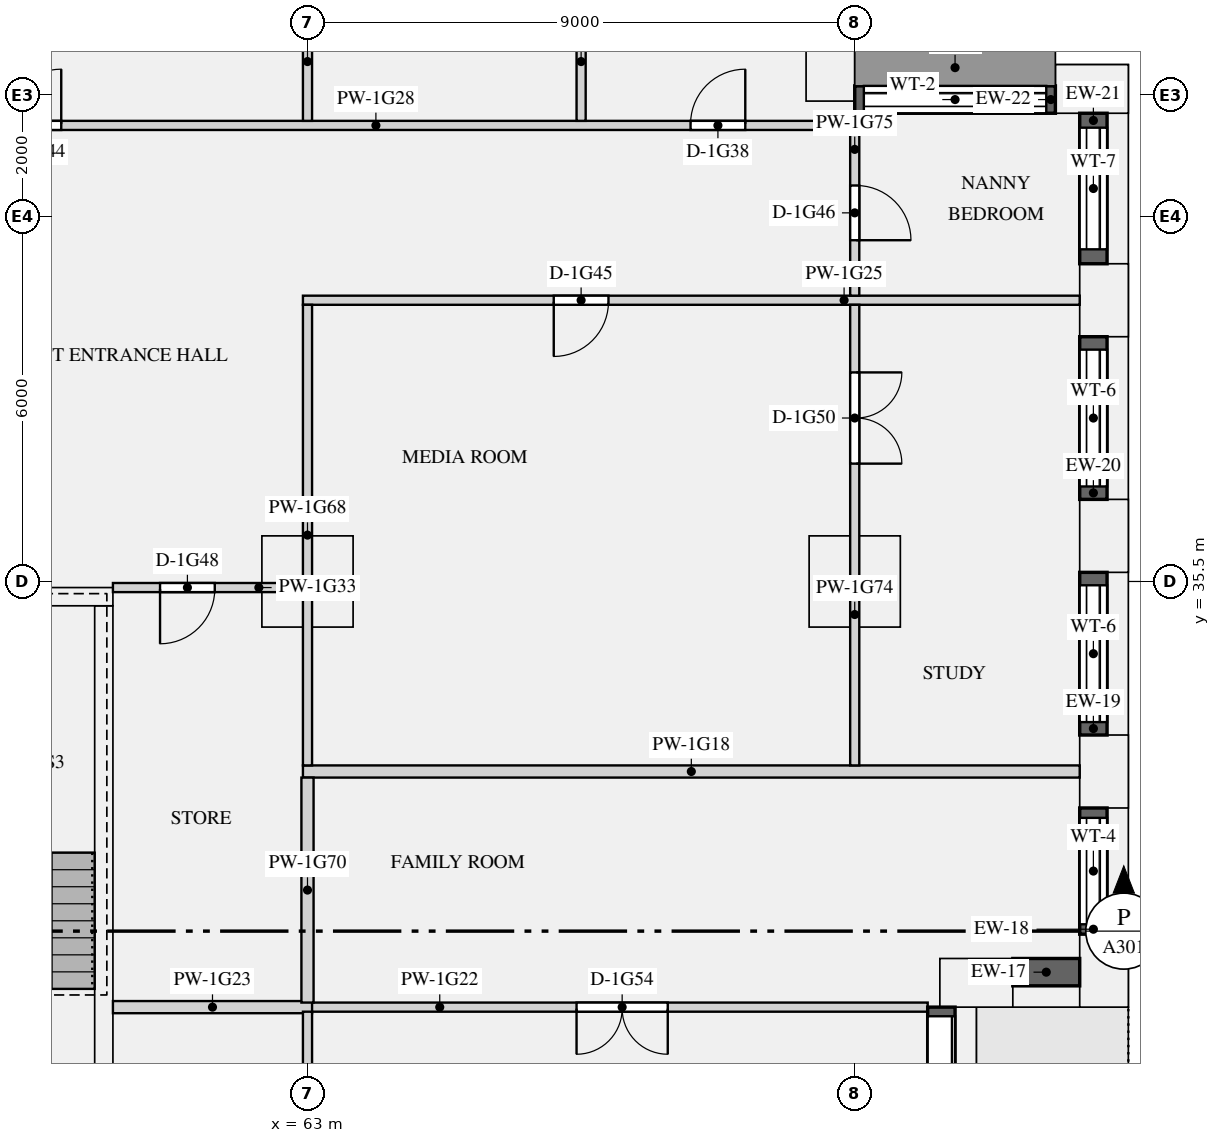
"""IFC4 building model, lengths in metres.
Left out: names, types, materials, properties, quantities, classifications, styles, units other than length and angle.
Written with IfcOpenShell. Run it as: python <this file> out.ifc"""

import sys

from ifc_helpers import new_model, si_unit, direction, frame, frame_2d, origin, origin_2d, place, context, subcontext, project, spatial, rectangle, extrude, element, fill, save


model = new_model("IFC4")
c1 = context("Model", 3, precision=1e-05, world=origin(), true_north=direction((0.0, 1.0)))
c2 = subcontext(c1, "Body", "Model", "MODEL_VIEW")
j1 = project(units=[si_unit("LENGTHUNIT", "METRE"), si_unit("PLANEANGLEUNIT", "RADIAN")], contexts=[c1])
p1 = place(None, origin())
s1 = spatial("IfcSite", under=j1, at=p1, CompositionType="ELEMENT")
p2 = place(p1, origin())
s2 = spatial("IfcBuilding", under=s1, at=p2, CompositionType="ELEMENT")
p3 = place(p2, frame((0.0, 0.0, 66.75)))
s3 = spatial("IfcBuildingStorey", under=s2, at=p3, CompositionType="ELEMENT", Elevation=66.75)
for number, where, z_axis, x_axis in (
    (1, (74.0, 28.9, 0.0), (0.0, 0.0, 1.0), (1.0, 0.0, 0.0)),
    (2, (76.1, 29.1, 0.0), (0.0, 0.0, 1.0), (0.0, 1.0, 0.0)),
    (3, (76.1, 32.375, 0.0), (0.0, 0.0, 1.0), (0.0, 1.0, 0.0)),
    (4, (76.1, 36.25, 0.0), (0.0, 0.0, 1.0), (0.0, 1.0, 0.0)),
    (5, (76.1, 40.125, 0.0), (0.0, 0.0, 1.0), (0.0, 1.0, 0.0)),
    (6, (75.9, 43.6, 0.0), (0.0, 0.0, 1.0), (-1.0, 0.0, 0.0)),
    (7, (71.6, 44.0, 0.0), (0.0, 0.0, 1.0), (0.0, 1.0, 0.0)),
):
    element("IfcColumn", number, at=place(p3, frame(where, z_axis=z_axis, x_axis=x_axis)), inside=s3, PredefinedType="USERDEFINED", context=c2, shape_type="SweptSolid", body=[
        extrude(rectangle(XDim=1.2, YDim=0.8, at=origin_2d()), origin(), (0.0, 0.0, 1.0), 3.15),
    ])
for number, where, z_axis, x_axis in (
    (8, (63.0, 35.5, 0.0), (0.0, 0.0, 1.0), (1.0, 0.0, 0.0)),
    (9, (72.0, 35.5, 0.0), (0.0, 0.0, 1.0), (1.0, 0.0, 0.0)),
):
    element("IfcColumn", number, at=place(p3, frame(where, z_axis=z_axis, x_axis=x_axis)), inside=s3, PredefinedType="COLUMN", context=c2, shape_type="SweptSolid", body=[
        extrude(rectangle(XDim=1.5, YDim=1.5, at=origin_2d()), origin(), (0.0, 0.0, 1.0), 3.15),
    ])
p4 = place(p3, frame((56.2, 35.25, 0.0), z_axis=(0.0, 0.0, 1.0), x_axis=(1.0, 0.0, 0.0)))
e10 = element("IfcWall", 10, at=p4, inside=s3, PredefinedType="SHEAR", context=c2, shape_type="SweptSolid", body=[
    extrude(rectangle(XDim=3.6, YDim=0.3, at=frame_2d((1.8, 0.0))), origin(), (0.0, 0.0, 1.0), 3.15),
])
p5 = place(p3, frame((59.65, 27.3, 0.0), z_axis=(0.0, 0.0, 1.0), x_axis=(0.0, 1.0, 0.0)))
e11 = element("IfcWall", 11, at=p5, inside=s3, PredefinedType="SHEAR", context=c2, shape_type="SweptSolid", body=[
    extrude(rectangle(XDim=7.8, YDim=0.3, at=frame_2d((3.9, 0.0))), origin(), (0.0, 0.0, 1.0), 3.15),
])
p6 = place(p3, frame((73.425, 25.1, 0.0), z_axis=(0.0, 0.0, 1.0), x_axis=(0.0, 1.0, 0.0)))
e12 = element("IfcWall", 12, at=p6, inside=s3, PredefinedType="SOLIDWALL", context=c2, shape_type="SweptSolid", body=[
    extrude(rectangle(XDim=3.4, YDim=0.45, at=frame_2d((1.7, 0.0))), origin(), (0.0, 0.0, 1.0), 2.83),
])
p7 = place(p6, frame((0.15, 0.0, 0.0)))
e13 = element("IfcOpeningElement", 13, at=p7, cuts=e12, PredefinedType="OPENING", context=c2, shape_type="SweptSolid", body=[
    extrude(rectangle(XDim=3.1, YDim=2.3, at=frame_2d((1.55, 1.15))), frame((0.0, 0.235, 0.0), z_axis=(0.0, -1.0, 0.0), x_axis=(1.0, 0.0, 0.0)), (0.0, 0.0, 1.0), 0.47),
])
p8 = place(p3, frame((74.6, 29.075, 0.9), z_axis=(0.0, 0.0, 1.0), x_axis=(1.0, 0.0, 0.0)))
e14 = element("IfcWall", 14, at=p8, inside=s3, PredefinedType="SOLIDWALL", context=c2, shape_type="SweptSolid", body=[
    extrude(rectangle(XDim=1.1, YDim=0.45, at=frame_2d((0.55, 0.0))), origin(), (0.0, 0.0, 1.0), 1.93),
])
p9 = place(p3, frame((75.925, 29.7, 0.9), z_axis=(0.0, 0.0, 1.0), x_axis=(0.0, 1.0, 0.0)))
e15 = element("IfcWall", 15, at=p9, inside=s3, PredefinedType="SOLIDWALL", context=c2, shape_type="SweptSolid", body=[
    extrude(rectangle(XDim=2.075, YDim=0.45, at=frame_2d((1.038, 0.0))), origin(), (0.0, 0.0, 1.0), 1.93),
])
p10 = place(p9, frame((0.163, 0.0, 0.15)))
e16 = element("IfcOpeningElement", 16, at=p10, cuts=e15, PredefinedType="OPENING", context=c2, shape_type="SweptSolid", body=[
    extrude(rectangle(XDim=1.75, YDim=1.5, at=frame_2d((0.875, 0.75))), frame((0.0, 0.235, 0.0), z_axis=(0.0, -1.0, 0.0), x_axis=(1.0, 0.0, 0.0)), (0.0, 0.0, 1.0), 0.47),
])
p11 = place(p3, frame((75.925, 32.975, 0.9), z_axis=(0.0, 0.0, 1.0), x_axis=(0.0, 1.0, 0.0)))
e17 = element("IfcWall", 17, at=p11, inside=s3, PredefinedType="SOLIDWALL", context=c2, shape_type="SweptSolid", body=[
    extrude(rectangle(XDim=2.675, YDim=0.45, at=frame_2d((1.337, 0.0))), origin(), (0.0, 0.0, 1.0), 1.93),
])
p12 = place(p11, frame((0.212, 0.0, 0.15)))
e18 = element("IfcOpeningElement", 18, at=p12, cuts=e17, PredefinedType="OPENING", context=c2, shape_type="SweptSolid", body=[
    extrude(rectangle(XDim=2.25, YDim=1.5, at=frame_2d((1.125, 0.75))), frame((0.0, 0.235, 0.0), z_axis=(0.0, -1.0, 0.0), x_axis=(1.0, 0.0, 0.0)), (0.0, 0.0, 1.0), 0.47),
])
p13 = place(p3, frame((75.925, 36.85, 0.9), z_axis=(0.0, 0.0, 1.0), x_axis=(0.0, 1.0, 0.0)))
e19 = element("IfcWall", 19, at=p13, inside=s3, PredefinedType="SOLIDWALL", context=c2, shape_type="SweptSolid", body=[
    extrude(rectangle(XDim=2.675, YDim=0.45, at=frame_2d((1.337, 0.0))), origin(), (0.0, 0.0, 1.0), 1.93),
])
p14 = place(p13, frame((0.212, 0.0, 0.15)))
e20 = element("IfcOpeningElement", 20, at=p14, cuts=e19, PredefinedType="OPENING", context=c2, shape_type="SweptSolid", body=[
    extrude(rectangle(XDim=2.25, YDim=1.5, at=frame_2d((1.125, 0.75))), frame((0.0, 0.235, 0.0), z_axis=(0.0, -1.0, 0.0), x_axis=(1.0, 0.0, 0.0)), (0.0, 0.0, 1.0), 0.47),
])
p15 = place(p3, frame((75.925, 40.725, 0.9), z_axis=(0.0, 0.0, 1.0), x_axis=(0.0, 1.0, 0.0)))
e21 = element("IfcWall", 21, at=p15, inside=s3, PredefinedType="SOLIDWALL", context=c2, shape_type="SweptSolid", body=[
    extrude(rectangle(XDim=2.475, YDim=0.45, at=frame_2d((1.237, 0.0))), origin(), (0.0, 0.0, 1.0), 1.93),
])
p16 = place(p15, frame((0.238, 0.0, 0.15)))
e22 = element("IfcOpeningElement", 22, at=p16, cuts=e21, PredefinedType="OPENING", context=c2, shape_type="SweptSolid", body=[
    extrude(rectangle(XDim=2.0, YDim=1.5, at=frame_2d((1.0, 0.75))), frame((0.0, 0.235, 0.0), z_axis=(0.0, -1.0, 0.0), x_axis=(1.0, 0.0, 0.0)), (0.0, 0.0, 1.0), 0.47),
])
p17 = place(p3, frame((75.3, 43.425, 0.9), z_axis=(0.0, 0.0, 1.0), x_axis=(-1.0, 0.0, 0.0)))
e23 = element("IfcWall", 23, at=p17, inside=s3, PredefinedType="SOLIDWALL", context=c2, shape_type="SweptSolid", body=[
    extrude(rectangle(XDim=3.3, YDim=0.45, at=frame_2d((1.65, 0.0))), origin(), (0.0, 0.0, 1.0), 1.93),
])
p18 = place(p17, frame((0.15, 0.0, 0.15)))
e24 = element("IfcOpeningElement", 24, at=p18, cuts=e23, PredefinedType="OPENING", context=c2, shape_type="SweptSolid", body=[
    extrude(rectangle(XDim=3.0, YDim=1.5, at=frame_2d((1.5, 0.75))), frame((0.0, 0.235, 0.0), z_axis=(0.0, -1.0, 0.0), x_axis=(1.0, 0.0, 0.0)), (0.0, 0.0, 1.0), 0.47),
])
p19 = place(p3, frame((62.925, 32.375, 0.0), z_axis=(0.0, 0.0, 1.0), x_axis=(1.0, 0.0, 0.0)))
e25 = element("IfcWall", 25, at=p19, inside=s3, PredefinedType="PARTITIONING", context=c2, shape_type="SweptSolid", body=[
    extrude(rectangle(XDim=12.775, YDim=0.2, at=frame_2d((6.387, 0.0))), origin(), (0.0, 0.0, 1.0), 2.83),
])
p20 = place(p3, frame((62.925, 28.5, 0.0), z_axis=(0.0, 0.0, 1.0), x_axis=(1.0, 0.0, 0.0)))
e26 = element("IfcWall", 26, at=p20, inside=s3, PredefinedType="PARTITIONING", context=c2, shape_type="SweptSolid", body=[
    extrude(rectangle(XDim=10.275, YDim=0.15, at=frame_2d((5.137, 0.0))), origin(), (0.0, 0.0, 1.0), 2.83),
])
p21 = place(p20, frame((4.5, 0.0, 0.0)))
e27 = element("IfcOpeningElement", 27, at=p21, cuts=e26, PredefinedType="OPENING", context=c2, shape_type="SweptSolid", body=[
    extrude(rectangle(XDim=1.5, YDim=2.1, at=frame_2d((0.75, 1.05))), frame((0.0, 0.085, 0.0), z_axis=(0.0, -1.0, 0.0), x_axis=(1.0, 0.0, 0.0)), (0.0, 0.0, 1.0), 0.17),
])
p22 = place(p3, frame((59.8, 28.5, 0.0), z_axis=(0.0, 0.0, 1.0), x_axis=(1.0, 0.0, 0.0)))
e28 = element("IfcWall", 28, at=p22, inside=s3, PredefinedType="PARTITIONING", context=c2, shape_type="SweptSolid", body=[
    extrude(rectangle(XDim=3.275, YDim=0.2, at=frame_2d((1.637, 0.0))), origin(), (0.0, 0.0, 1.0), 2.83),
])
p23 = place(p3, frame((62.925, 40.125, 0.0), z_axis=(0.0, 0.0, 1.0), x_axis=(1.0, 0.0, 0.0)))
e29 = element("IfcWall", 29, at=p23, inside=s3, PredefinedType="PARTITIONING", context=c2, shape_type="SweptSolid", body=[
    extrude(rectangle(XDim=12.775, YDim=0.15, at=frame_2d((6.387, 0.0))), origin(), (0.0, 0.0, 1.0), 2.83),
])
p24 = place(p23, frame((4.125, 0.0, 0.0)))
e30 = element("IfcOpeningElement", 30, at=p24, cuts=e29, PredefinedType="OPENING", context=c2, shape_type="SweptSolid", body=[
    extrude(rectangle(XDim=0.9, YDim=2.1, at=frame_2d((0.45, 1.05))), frame((0.0, 0.085, 0.0), z_axis=(0.0, -1.0, 0.0), x_axis=(1.0, 0.0, 0.0)), (0.0, 0.0, 1.0), 0.17),
])
p25 = place(p3, frame((53.925, 43.0, 0.0), z_axis=(0.0, 0.0, 1.0), x_axis=(1.0, 0.0, 0.0)))
e31 = element("IfcWall", 31, at=p25, inside=s3, PredefinedType="PARTITIONING", context=c2, shape_type="SweptSolid", body=[
    extrude(rectangle(XDim=18.0, YDim=0.15, at=frame_2d((9.0, 0.0))), origin(), (0.0, 0.0, 1.0), 2.83),
])
p26 = place(p25, frame((15.375, 0.0, 0.0)))
e32 = element("IfcOpeningElement", 32, at=p26, cuts=e31, PredefinedType="OPENING", context=c2, shape_type="SweptSolid", body=[
    extrude(rectangle(XDim=0.9, YDim=2.1, at=frame_2d((0.45, 1.05))), frame((0.0, 0.085, 0.0), z_axis=(0.0, -1.0, 0.0), x_axis=(1.0, 0.0, 0.0)), (0.0, 0.0, 1.0), 0.17),
])
p27 = place(p25, frame((4.125, 0.0, 0.0)))
e33 = element("IfcOpeningElement", 33, at=p27, cuts=e31, PredefinedType="OPENING", context=c2, shape_type="SweptSolid", body=[
    extrude(rectangle(XDim=0.9, YDim=2.1, at=frame_2d((0.45, 1.05))), frame((0.0, 0.085, 0.0), z_axis=(0.0, -1.0, 0.0), x_axis=(1.0, 0.0, 0.0)), (0.0, 0.0, 1.0), 0.17),
])
p28 = place(p3, frame((59.8, 35.4, 0.0), z_axis=(0.0, 0.0, 1.0), x_axis=(1.0, 0.0, 0.0)))
e34 = element("IfcWall", 34, at=p28, inside=s3, PredefinedType="PARTITIONING", context=c2, shape_type="SweptSolid", body=[
    extrude(rectangle(XDim=3.125, YDim=0.15, at=frame_2d((1.562, 0.0))), origin(), (0.0, 0.0, 1.0), 2.83),
])
p29 = place(p28, frame((0.775, 0.0, 0.0)))
e35 = element("IfcOpeningElement", 35, at=p29, cuts=e34, PredefinedType="OPENING", context=c2, shape_type="SweptSolid", body=[
    extrude(rectangle(XDim=0.9, YDim=2.1, at=frame_2d((0.45, 1.05))), frame((0.0, 0.085, 0.0), z_axis=(0.0, -1.0, 0.0), x_axis=(1.0, 0.0, 0.0)), (0.0, 0.0, 1.0), 0.17),
])
p30 = place(p3, frame((63.0, 12.575, 0.0), z_axis=(0.0, 0.0, 1.0), x_axis=(0.0, 1.0, 0.0)))
e36 = element("IfcWall", 36, at=p30, inside=s3, PredefinedType="PARTITIONING", context=c2, shape_type="SweptSolid", body=[
    extrude(rectangle(XDim=15.85, YDim=0.15, at=frame_2d((7.925, 0.0))), origin(), (0.0, 0.0, 1.0), 2.83),
])
p31 = place(p30, frame((6.85, 0.0, 0.0)))
e37 = element("IfcOpeningElement", 37, at=p31, cuts=e36, PredefinedType="OPENING", context=c2, shape_type="SweptSolid", body=[
    extrude(rectangle(XDim=0.9, YDim=2.1, at=frame_2d((0.45, 1.05))), frame((0.0, 0.085, 0.0), z_axis=(0.0, -1.0, 0.0), x_axis=(1.0, 0.0, 0.0)), (0.0, 0.0, 1.0), 0.17),
])
p32 = place(p3, frame((63.0, 32.475, 0.0), z_axis=(0.0, 0.0, 1.0), x_axis=(0.0, 1.0, 0.0)))
e38 = element("IfcWall", 38, at=p32, inside=s3, PredefinedType="PARTITIONING", context=c2, shape_type="SweptSolid", body=[
    extrude(rectangle(XDim=7.575, YDim=0.15, at=frame_2d((3.788, 0.0))), origin(), (0.0, 0.0, 1.0), 2.83),
])
p33 = place(p3, frame((63.0, 43.075, 0.0), z_axis=(0.0, 0.0, 1.0), x_axis=(0.0, 1.0, 0.0)))
e39 = element("IfcWall", 39, at=p33, inside=s3, PredefinedType="PARTITIONING", context=c2, shape_type="SweptSolid", body=[
    extrude(rectangle(XDim=4.625, YDim=0.15, at=frame_2d((2.312, 0.0))), origin(), (0.0, 0.0, 1.0), 2.83),
])
p34 = place(p33, frame((1.95, 0.0, 0.0)))
e40 = element("IfcOpeningElement", 40, at=p34, cuts=e39, PredefinedType="OPENING", context=c2, shape_type="SweptSolid", body=[
    extrude(rectangle(XDim=0.8, YDim=2.1, at=frame_2d((0.4, 1.05))), frame((0.0, 0.085, 0.0), z_axis=(0.0, -1.0, 0.0), x_axis=(1.0, 0.0, 0.0)), (0.0, 0.0, 1.0), 0.17),
])
p35 = place(p3, frame((63.0, 28.575, 0.0), z_axis=(0.0, 0.0, 1.0), x_axis=(0.0, 1.0, 0.0)))
e41 = element("IfcWall", 41, at=p35, inside=s3, PredefinedType="PARTITIONING", context=c2, shape_type="SweptSolid", body=[
    extrude(rectangle(XDim=3.7, YDim=0.2, at=frame_2d((1.85, 0.0))), origin(), (0.0, 0.0, 1.0), 2.83),
])
p36 = place(p3, frame((72.0, 32.475, 0.0), z_axis=(0.0, 0.0, 1.0), x_axis=(0.0, 1.0, 0.0)))
e42 = element("IfcWall", 42, at=p36, inside=s3, PredefinedType="PARTITIONING", context=c2, shape_type="SweptSolid", body=[
    extrude(rectangle(XDim=7.575, YDim=0.15, at=frame_2d((3.788, 0.0))), origin(), (0.0, 0.0, 1.0), 2.83),
])
p37 = place(p36, frame((4.963, 0.0, 0.0)))
e43 = element("IfcOpeningElement", 43, at=p37, cuts=e42, PredefinedType="OPENING", context=c2, shape_type="SweptSolid", body=[
    extrude(rectangle(XDim=1.5, YDim=2.1, at=frame_2d((0.75, 1.05))), frame((0.0, 0.085, 0.0), z_axis=(0.0, -1.0, 0.0), x_axis=(1.0, 0.0, 0.0)), (0.0, 0.0, 1.0), 0.17),
])
p38 = place(p3, frame((72.0, 40.2, 0.0), z_axis=(0.0, 0.0, 1.0), x_axis=(0.0, 1.0, 0.0)))
e44 = element("IfcWall", 44, at=p38, inside=s3, PredefinedType="PARTITIONING", context=c2, shape_type="SweptSolid", body=[
    extrude(rectangle(XDim=3.0, YDim=0.15, at=frame_2d((1.5, 0.0))), origin(), (0.0, 0.0, 1.0), 2.83),
])
p39 = place(p38, frame((0.912, 0.0, 0.0)))
e45 = element("IfcOpeningElement", 45, at=p39, cuts=e44, PredefinedType="OPENING", context=c2, shape_type="SweptSolid", body=[
    extrude(rectangle(XDim=0.9, YDim=2.1, at=frame_2d((0.45, 1.05))), frame((0.0, 0.085, 0.0), z_axis=(0.0, -1.0, 0.0), x_axis=(1.0, 0.0, 0.0)), (0.0, 0.0, 1.0), 0.17),
])
p40 = place(p3, frame((67.5, 43.075, 0.0), z_axis=(0.0, 0.0, 1.0), x_axis=(0.0, 1.0, 0.0)))
e46 = element("IfcWall", 46, at=p40, inside=s3, PredefinedType="PARTITIONING", context=c2, shape_type="SweptSolid", body=[
    extrude(rectangle(XDim=4.625, YDim=0.15, at=frame_2d((2.312, 0.0))), origin(), (0.0, 0.0, 1.0), 2.83),
])
p41 = place(p40, frame((1.95, 0.0, 0.0)))
e47 = element("IfcOpeningElement", 47, at=p41, cuts=e46, PredefinedType="OPENING", context=c2, shape_type="SweptSolid", body=[
    extrude(rectangle(XDim=0.8, YDim=2.1, at=frame_2d((0.4, 1.05))), frame((0.0, 0.085, 0.0), z_axis=(0.0, -1.0, 0.0), x_axis=(1.0, 0.0, 0.0)), (0.0, 0.0, 1.0), 0.17),
])
p42 = place(p7, origin())
e48 = element("IfcDoor", 48, at=p42, inside=s3, OperationType="SLIDING_TO_LEFT", PredefinedType="DOOR", context=c2, shape_type="SweptSolid", body=[
    extrude(rectangle(XDim=3.1, YDim=2.3, at=frame_2d((1.55, 1.15))), frame((0.0, -0.07, 0.0), z_axis=(0.0, -1.0, 0.0), x_axis=(1.0, 0.0, 0.0)), (0.0, 0.0, 1.0), 0.05),
])
fill(e13, e48)
p43 = place(p10, origin())
e49 = element("IfcWindow", 49, at=p43, inside=s3, PartitioningType="SINGLE_PANEL", PredefinedType="WINDOW", context=c2, shape_type="SweptSolid", body=[
    extrude(rectangle(XDim=1.75, YDim=1.5, at=frame_2d((0.875, 0.75))), frame((0.0, -0.065, 0.0), z_axis=(0.0, -1.0, 0.0), x_axis=(1.0, 0.0, 0.0)), (0.0, 0.0, 1.0), 0.06),
])
fill(e16, e49)
p44 = place(p12, origin())
e50 = element("IfcWindow", 50, at=p44, inside=s3, PartitioningType="SINGLE_PANEL", PredefinedType="WINDOW", context=c2, shape_type="SweptSolid", body=[
    extrude(rectangle(XDim=2.25, YDim=1.5, at=frame_2d((1.125, 0.75))), frame((0.0, -0.065, 0.0), z_axis=(0.0, -1.0, 0.0), x_axis=(1.0, 0.0, 0.0)), (0.0, 0.0, 1.0), 0.06),
])
fill(e18, e50)
p45 = place(p14, origin())
e51 = element("IfcWindow", 51, at=p45, inside=s3, PartitioningType="SINGLE_PANEL", PredefinedType="WINDOW", context=c2, shape_type="SweptSolid", body=[
    extrude(rectangle(XDim=2.25, YDim=1.5, at=frame_2d((1.125, 0.75))), frame((0.0, -0.065, 0.0), z_axis=(0.0, -1.0, 0.0), x_axis=(1.0, 0.0, 0.0)), (0.0, 0.0, 1.0), 0.06),
])
fill(e20, e51)
p46 = place(p16, origin())
e52 = element("IfcWindow", 52, at=p46, inside=s3, PartitioningType="SINGLE_PANEL", PredefinedType="WINDOW", context=c2, shape_type="SweptSolid", body=[
    extrude(rectangle(XDim=2.0, YDim=1.5, at=frame_2d((1.0, 0.75))), frame((0.0, -0.065, 0.0), z_axis=(0.0, -1.0, 0.0), x_axis=(1.0, 0.0, 0.0)), (0.0, 0.0, 1.0), 0.06),
])
fill(e22, e52)
p47 = place(p18, origin())
e53 = element("IfcWindow", 53, at=p47, inside=s3, PartitioningType="SINGLE_PANEL", PredefinedType="WINDOW", context=c2, shape_type="SweptSolid", body=[
    extrude(rectangle(XDim=3.0, YDim=1.5, at=frame_2d((1.5, 0.75))), frame((0.0, -0.065, 0.0), z_axis=(0.0, -1.0, 0.0), x_axis=(1.0, 0.0, 0.0)), (0.0, 0.0, 1.0), 0.06),
])
fill(e24, e53)
p48 = place(p26, origin())
e54 = element("IfcDoor", 54, at=p48, inside=s3, OperationType="SINGLE_SWING_RIGHT", PredefinedType="DOOR", context=c2, shape_type="SweptSolid", body=[
    extrude(rectangle(XDim=0.9, YDim=2.1, at=frame_2d((0.45, 1.05))), frame((0.0, 0.025, 0.0), z_axis=(0.0, -1.0, 0.0), x_axis=(1.0, 0.0, 0.0)), (0.0, 0.0, 1.0), 0.05),
])
fill(e32, e54)
p49 = place(p27, origin())
e55 = element("IfcDoor", 55, at=p49, inside=s3, OperationType="SINGLE_SWING_RIGHT", PredefinedType="DOOR", context=c2, shape_type="SweptSolid", body=[
    extrude(rectangle(XDim=0.9, YDim=2.1, at=frame_2d((0.45, 1.05))), frame((0.0, 0.025, 0.0), z_axis=(0.0, -1.0, 0.0), x_axis=(1.0, 0.0, 0.0)), (0.0, 0.0, 1.0), 0.05),
])
fill(e33, e55)
p50 = place(p24, frame((0.9, 0.0, 0.0), z_axis=(0.0, 0.0, 1.0), x_axis=(-1.0, 0.0, 0.0)))
e56 = element("IfcDoor", 56, at=p50, inside=s3, OperationType="SINGLE_SWING_RIGHT", PredefinedType="DOOR", context=c2, shape_type="SweptSolid", body=[
    extrude(rectangle(XDim=0.9, YDim=2.1, at=frame_2d((0.45, 1.05))), frame((0.0, 0.025, 0.0), z_axis=(0.0, -1.0, 0.0), x_axis=(1.0, 0.0, 0.0)), (0.0, 0.0, 1.0), 0.05),
])
fill(e30, e56)
p51 = place(p39, frame((0.9, 0.0, 0.0), z_axis=(0.0, 0.0, 1.0), x_axis=(-1.0, 0.0, 0.0)))
e57 = element("IfcDoor", 57, at=p51, inside=s3, OperationType="SINGLE_SWING_RIGHT", PredefinedType="DOOR", context=c2, shape_type="SweptSolid", body=[
    extrude(rectangle(XDim=0.9, YDim=2.1, at=frame_2d((0.45, 1.05))), frame((0.0, 0.025, 0.0), z_axis=(0.0, -1.0, 0.0), x_axis=(1.0, 0.0, 0.0)), (0.0, 0.0, 1.0), 0.05),
])
fill(e45, e57)
p52 = place(p29, frame((0.9, 0.0, 0.0), z_axis=(0.0, 0.0, 1.0), x_axis=(-1.0, 0.0, 0.0)))
e58 = element("IfcDoor", 58, at=p52, inside=s3, OperationType="SINGLE_SWING_RIGHT", PredefinedType="DOOR", context=c2, shape_type="SweptSolid", body=[
    extrude(rectangle(XDim=0.9, YDim=2.1, at=frame_2d((0.45, 1.05))), frame((0.0, 0.025, 0.0), z_axis=(0.0, -1.0, 0.0), x_axis=(1.0, 0.0, 0.0)), (0.0, 0.0, 1.0), 0.05),
])
fill(e35, e58)
p53 = place(p37, frame((1.5, 0.0, 0.0), z_axis=(0.0, 0.0, 1.0), x_axis=(-1.0, 0.0, 0.0)))
e59 = element("IfcDoor", 59, at=p53, inside=s3, OperationType="DOUBLE_DOOR_SINGLE_SWING", PredefinedType="DOOR", context=c2, shape_type="SweptSolid", body=[
    extrude(rectangle(XDim=1.5, YDim=2.1, at=frame_2d((0.75, 1.05))), frame((0.0, 0.025, 0.0), z_axis=(0.0, -1.0, 0.0), x_axis=(1.0, 0.0, 0.0)), (0.0, 0.0, 1.0), 0.05),
])
fill(e43, e59)
p54 = place(p21, frame((1.5, 0.0, 0.0), z_axis=(0.0, 0.0, 1.0), x_axis=(-1.0, 0.0, 0.0)))
e60 = element("IfcDoor", 60, at=p54, inside=s3, OperationType="DOUBLE_DOOR_SINGLE_SWING", PredefinedType="DOOR", context=c2, shape_type="SweptSolid", body=[
    extrude(rectangle(XDim=1.5, YDim=2.1, at=frame_2d((0.75, 1.05))), frame((0.0, 0.025, 0.0), z_axis=(0.0, -1.0, 0.0), x_axis=(1.0, 0.0, 0.0)), (0.0, 0.0, 1.0), 0.05),
])
fill(e27, e60)
save(model, sys.argv[1])
